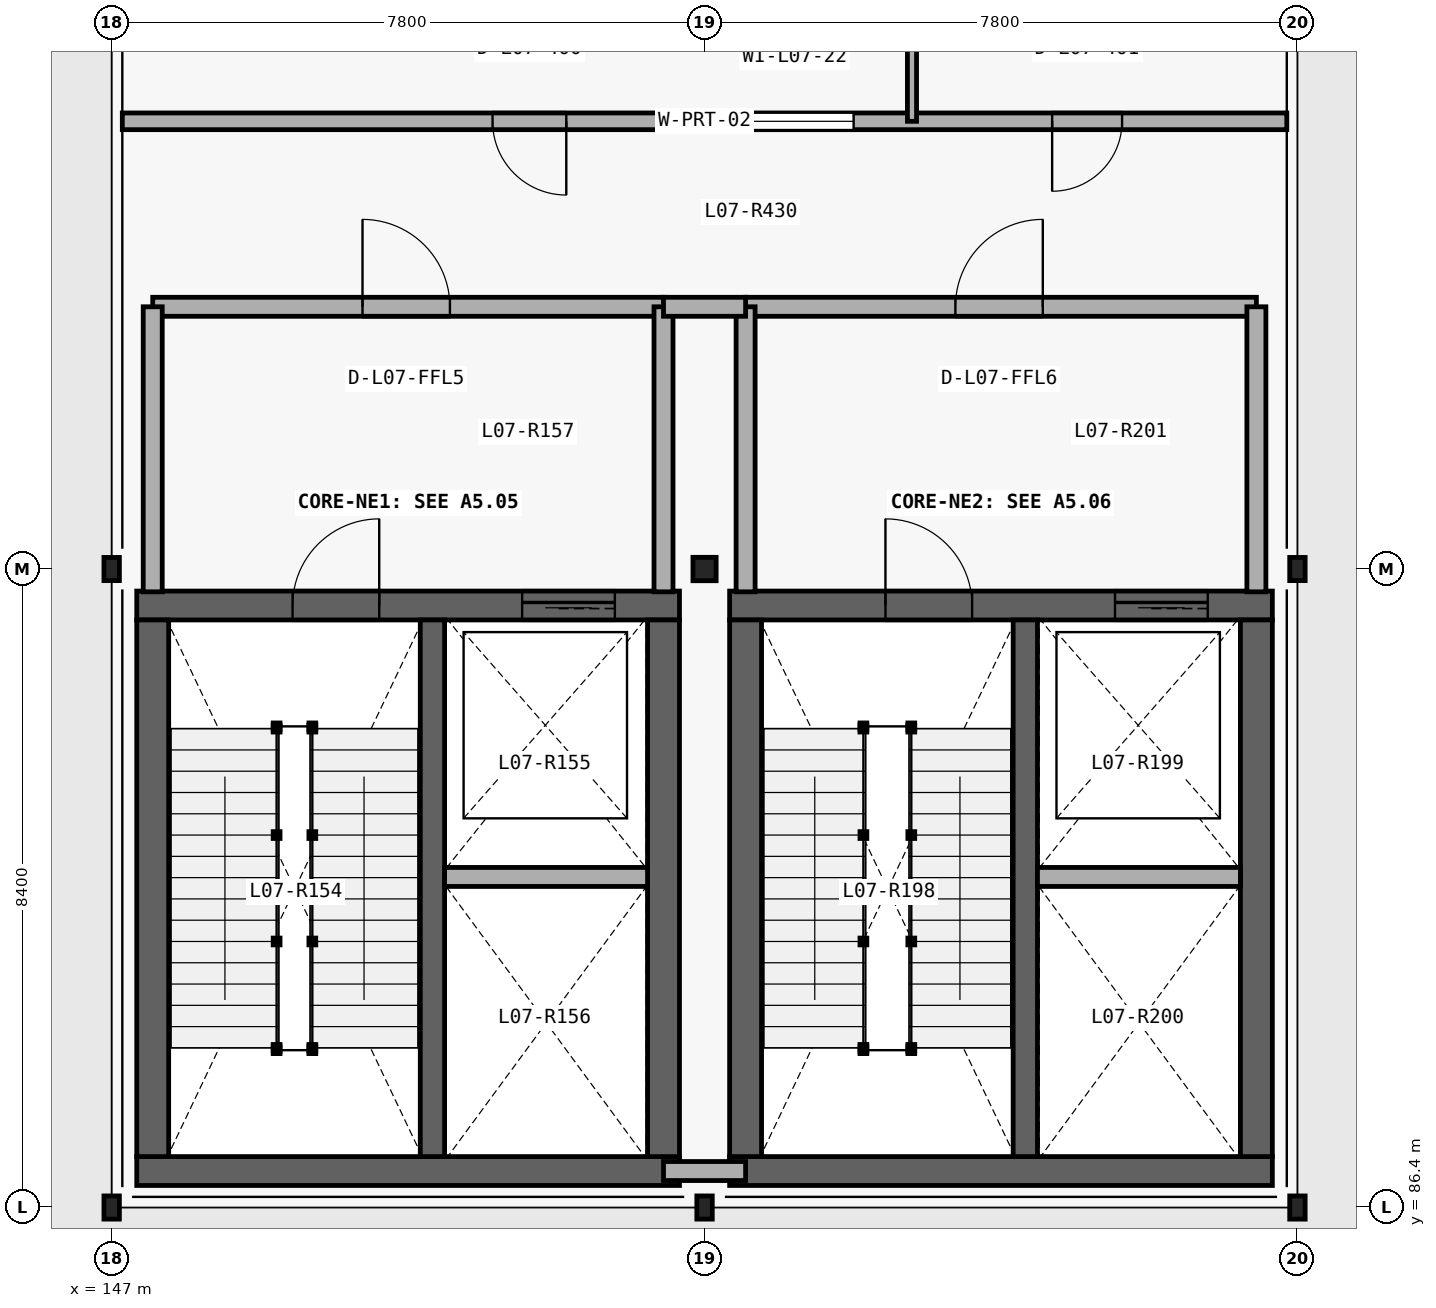
"""IFC4 building model, lengths in metres.
Left out: names, types, materials, properties, quantities, classifications, styles, units other than length and angle.
Written with IfcOpenShell. Run it as: python <this file> out.ifc"""

import sys

from ifc_helpers import new_model, si_unit, direction, frame, frame_2d, origin_with_axes, origin_2d_with_axis, place, context, subcontext, project, spatial, rectangle, hollow_rectangle, i_section, extrude, element, fill, save


model = new_model("IFC4")
c1 = context("Model", 3, precision=1e-05, world=origin_with_axes(), true_north=direction((0.0, 1.0)))
c2 = subcontext(c1, "Body", "Model", "MODEL_VIEW")
j1 = project(units=[si_unit("LENGTHUNIT", "METRE"), si_unit("PLANEANGLEUNIT", "RADIAN")], contexts=[c1])
p1 = place(None, origin_with_axes())
s1 = spatial("IfcSite", under=j1, at=p1, CompositionType="ELEMENT")
p2 = place(p1, origin_with_axes())
s2 = spatial("IfcBuilding", under=s1, at=p2, CompositionType="ELEMENT")
p3 = place(p2, frame((0.0, 0.0, 34.5), z_axis=(0.0, 0.0, 1.0), x_axis=(1.0, 0.0, 0.0)))
s3 = spatial("IfcBuildingStorey", under=s2, at=p3, CompositionType="ELEMENT", Elevation=34.5)
p4 = place(None, frame((147.33, 86.88, 34.5), z_axis=(0.0, 0.0, 1.0), x_axis=(1.0, 0.0, 0.0)))
e1 = element("IfcWall", 1, at=p4, inside=s3, PredefinedType="SHEAR", context=c2, shape_type="SweptSolid", body=[
    extrude(rectangle(XDim=7.14, YDim=0.38, at=frame_2d((3.57, 0.0), x_axis=(1.0, 0.0))), origin_with_axes(), (0.0, 0.0, 1.0), 4.5),
])
p5 = place(None, frame((154.47, 94.32, 34.5), z_axis=(0.0, 0.0, 1.0), x_axis=(-1.0, 0.0, 0.0)))
e2 = element("IfcWall", 2, at=p5, inside=s3, PredefinedType="SHEAR", context=c2, shape_type="SweptSolid", body=[
    extrude(rectangle(XDim=7.14, YDim=0.38, at=frame_2d((3.57, 0.0), x_axis=(1.0, 0.0))), origin_with_axes(), (0.0, 0.0, 1.0), 4.5),
])
p6 = place(None, frame((149.95, 94.32, 34.5), z_axis=(0.0, 0.0, 1.0), x_axis=(-1.0, 0.0, 0.0)))
e3 = element("IfcOpeningElement", 3, at=p6, cuts=e2, PredefinedType="OPENING", context=c2, shape_type="SweptSolid", body=[
    extrude(rectangle(XDim=1.14, YDim=2.18, at=frame_2d((0.0, 1.09), x_axis=(1.0, 0.0))), frame((0.0, 0.2, 0.0), z_axis=(0.0, -1.0, 0.0), x_axis=(1.0, 0.0, 0.0)), (0.0, 0.0, 1.0), 0.4),
])
p7 = place(None, frame((153.01, 94.32, 34.5), z_axis=(0.0, 0.0, 1.0), x_axis=(-1.0, 0.0, 0.0)))
e4 = element("IfcOpeningElement", 4, at=p7, cuts=e2, PredefinedType="OPENING", context=c2, shape_type="SweptSolid", body=[
    extrude(rectangle(XDim=1.22, YDim=2.28, at=frame_2d((0.0, 1.14), x_axis=(1.0, 0.0))), frame((0.0, 0.2, 0.0), z_axis=(0.0, -1.0, 0.0), x_axis=(1.0, 0.0, 0.0)), (0.0, 0.0, 1.0), 0.4),
])
for number, where, z_axis, x_axis in (
    (5, (154.26, 87.07, 34.5), (0.0, 0.0, 1.0), (0.0, 1.0, 0.0)),
    (6, (147.54, 94.13, 34.5), (0.0, 0.0, 1.0), (0.0, -1.0, 0.0)),
):
    element("IfcWall", number, at=place(None, frame(where, z_axis=z_axis, x_axis=x_axis)), inside=s3, PredefinedType="SHEAR", context=c2, shape_type="SweptSolid", body=[
        extrude(rectangle(XDim=7.06, YDim=0.42, at=frame_2d((3.53, 0.0), x_axis=(1.0, 0.0))), origin_with_axes(), (0.0, 0.0, 1.0), 4.5),
    ])
p8 = place(None, frame((151.22, 87.07, 34.5), z_axis=(0.0, 0.0, 1.0), x_axis=(0.0, 1.0, 0.0)))
e7 = element("IfcWall", 7, at=p8, inside=s3, PredefinedType="SHEAR", context=c2, shape_type="SweptSolid", body=[
    extrude(rectangle(XDim=7.06, YDim=0.32, at=frame_2d((3.53, 0.0), x_axis=(1.0, 0.0))), origin_with_axes(), (0.0, 0.0, 1.0), 4.5),
])
p9 = place(None, frame((151.38, 90.749, 34.5), z_axis=(0.0, 0.0, 1.0), x_axis=(1.0, 0.0, 0.0)))
e8 = element("IfcWall", 8, at=p9, inside=s3, PredefinedType="PARTITIONING", context=c2, shape_type="SweptSolid", body=[
    extrude(rectangle(XDim=2.67, YDim=0.25, at=frame_2d((1.335, 0.0), x_axis=(1.0, 0.0))), origin_with_axes(), (0.0, 0.0, 1.0), 4.14),
])
p10 = place(None, frame((154.26, 98.25, 34.5), z_axis=(0.0, 0.0, 1.0), x_axis=(-1.0, 0.0, 0.0)))
e9 = element("IfcWall", 9, at=p10, inside=s3, PredefinedType="PARTITIONING", context=c2, shape_type="SweptSolid", body=[
    extrude(rectangle(XDim=6.72, YDim=0.25, at=frame_2d((3.36, 0.0), x_axis=(1.0, 0.0))), origin_with_axes(), (0.0, 0.0, 1.0), 4.14),
])
p11 = place(None, frame((150.875, 98.25, 34.5), z_axis=(0.0, 0.0, 1.0), x_axis=(-1.0, 0.0, 0.0)))
e10 = element("IfcOpeningElement", 10, at=p11, cuts=e9, PredefinedType="OPENING", context=c2, shape_type="SweptSolid", body=[
    extrude(rectangle(XDim=1.15, YDim=2.25, at=frame_2d((0.0, 1.125), x_axis=(1.0, 0.0))), frame((0.0, 0.135, 0.0), z_axis=(0.0, -1.0, 0.0), x_axis=(1.0, 0.0, 0.0)), (0.0, 0.0, 1.0), 0.27),
])
for number, where, z_axis, x_axis in (
    (11, (147.54, 94.5, 34.5), (0.0, 0.0, 1.0), (0.0, 1.0, 0.0)),
    (12, (154.26, 94.5, 34.5), (0.0, 0.0, 1.0), (0.0, 1.0, 0.0)),
):
    element("IfcWall", number, at=place(None, frame(where, z_axis=z_axis, x_axis=x_axis)), inside=s3, PredefinedType="PARTITIONING", context=c2, shape_type="SweptSolid", body=[
        extrude(rectangle(XDim=3.75, YDim=0.25, at=frame_2d((1.875, 0.0), x_axis=(1.0, 0.0))), origin_with_axes(), (0.0, 0.0, 1.0), 4.14),
    ])
p12 = place(None, frame((155.13, 86.88, 34.5), z_axis=(0.0, 0.0, 1.0), x_axis=(1.0, 0.0, 0.0)))
e13 = element("IfcWall", 13, at=p12, inside=s3, PredefinedType="SHEAR", context=c2, shape_type="SweptSolid", body=[
    extrude(rectangle(XDim=7.14, YDim=0.38, at=frame_2d((3.57, 0.0), x_axis=(1.0, 0.0))), origin_with_axes(), (0.0, 0.0, 1.0), 4.5),
])
p13 = place(None, frame((162.27, 94.32, 34.5), z_axis=(0.0, 0.0, 1.0), x_axis=(-1.0, 0.0, 0.0)))
e14 = element("IfcWall", 14, at=p13, inside=s3, PredefinedType="SHEAR", context=c2, shape_type="SweptSolid", body=[
    extrude(rectangle(XDim=7.14, YDim=0.38, at=frame_2d((3.57, 0.0), x_axis=(1.0, 0.0))), origin_with_axes(), (0.0, 0.0, 1.0), 4.5),
])
p14 = place(None, frame((157.75, 94.32, 34.5), z_axis=(0.0, 0.0, 1.0), x_axis=(-1.0, 0.0, 0.0)))
e15 = element("IfcOpeningElement", 15, at=p14, cuts=e14, PredefinedType="OPENING", context=c2, shape_type="SweptSolid", body=[
    extrude(rectangle(XDim=1.14, YDim=2.18, at=frame_2d((0.0, 1.09), x_axis=(1.0, 0.0))), frame((0.0, 0.2, 0.0), z_axis=(0.0, -1.0, 0.0), x_axis=(1.0, 0.0, 0.0)), (0.0, 0.0, 1.0), 0.4),
])
p15 = place(None, frame((160.81, 94.32, 34.5), z_axis=(0.0, 0.0, 1.0), x_axis=(-1.0, 0.0, 0.0)))
e16 = element("IfcOpeningElement", 16, at=p15, cuts=e14, PredefinedType="OPENING", context=c2, shape_type="SweptSolid", body=[
    extrude(rectangle(XDim=1.22, YDim=2.28, at=frame_2d((0.0, 1.14), x_axis=(1.0, 0.0))), frame((0.0, 0.2, 0.0), z_axis=(0.0, -1.0, 0.0), x_axis=(1.0, 0.0, 0.0)), (0.0, 0.0, 1.0), 0.4),
])
for number, where, z_axis, x_axis in (
    (17, (162.06, 87.07, 34.5), (0.0, 0.0, 1.0), (0.0, 1.0, 0.0)),
    (18, (155.34, 94.13, 34.5), (0.0, 0.0, 1.0), (0.0, -1.0, 0.0)),
):
    element("IfcWall", number, at=place(None, frame(where, z_axis=z_axis, x_axis=x_axis)), inside=s3, PredefinedType="SHEAR", context=c2, shape_type="SweptSolid", body=[
        extrude(rectangle(XDim=7.06, YDim=0.42, at=frame_2d((3.53, 0.0), x_axis=(1.0, 0.0))), origin_with_axes(), (0.0, 0.0, 1.0), 4.5),
    ])
p16 = place(None, frame((159.02, 87.07, 34.5), z_axis=(0.0, 0.0, 1.0), x_axis=(0.0, 1.0, 0.0)))
e19 = element("IfcWall", 19, at=p16, inside=s3, PredefinedType="SHEAR", context=c2, shape_type="SweptSolid", body=[
    extrude(rectangle(XDim=7.06, YDim=0.32, at=frame_2d((3.53, 0.0), x_axis=(1.0, 0.0))), origin_with_axes(), (0.0, 0.0, 1.0), 4.5),
])
p17 = place(None, frame((159.18, 90.749, 34.5), z_axis=(0.0, 0.0, 1.0), x_axis=(1.0, 0.0, 0.0)))
e20 = element("IfcWall", 20, at=p17, inside=s3, PredefinedType="PARTITIONING", context=c2, shape_type="SweptSolid", body=[
    extrude(rectangle(XDim=2.67, YDim=0.25, at=frame_2d((1.335, 0.0), x_axis=(1.0, 0.0))), origin_with_axes(), (0.0, 0.0, 1.0), 4.14),
])
p18 = place(None, frame((162.06, 98.25, 34.5), z_axis=(0.0, 0.0, 1.0), x_axis=(-1.0, 0.0, 0.0)))
e21 = element("IfcWall", 21, at=p18, inside=s3, PredefinedType="PARTITIONING", context=c2, shape_type="SweptSolid", body=[
    extrude(rectangle(XDim=6.72, YDim=0.25, at=frame_2d((3.36, 0.0), x_axis=(1.0, 0.0))), origin_with_axes(), (0.0, 0.0, 1.0), 4.14),
])
p19 = place(None, frame((158.675, 98.25, 34.5), z_axis=(0.0, 0.0, 1.0), x_axis=(-1.0, 0.0, 0.0)))
e22 = element("IfcOpeningElement", 22, at=p19, cuts=e21, PredefinedType="OPENING", context=c2, shape_type="SweptSolid", body=[
    extrude(rectangle(XDim=1.15, YDim=2.25, at=frame_2d((0.0, 1.125), x_axis=(1.0, 0.0))), frame((0.0, 0.135, 0.0), z_axis=(0.0, -1.0, 0.0), x_axis=(1.0, 0.0, 0.0)), (0.0, 0.0, 1.0), 0.27),
])
for number, where, z_axis, x_axis in (
    (23, (155.34, 94.5, 34.5), (0.0, 0.0, 1.0), (0.0, 1.0, 0.0)),
    (24, (162.06, 94.5, 34.5), (0.0, 0.0, 1.0), (0.0, 1.0, 0.0)),
):
    element("IfcWall", number, at=place(None, frame(where, z_axis=z_axis, x_axis=x_axis)), inside=s3, PredefinedType="PARTITIONING", context=c2, shape_type="SweptSolid", body=[
        extrude(rectangle(XDim=3.75, YDim=0.25, at=frame_2d((1.875, 0.0), x_axis=(1.0, 0.0))), origin_with_axes(), (0.0, 0.0, 1.0), 4.14),
    ])
for number, where, z_axis, x_axis in (
    (25, (154.26, 98.25, 34.5), (0.0, 0.0, 1.0), (1.0, 0.0, 0.0)),
    (26, (154.26, 86.88, 34.5), (0.0, 0.0, 1.0), (1.0, 0.0, 0.0)),
):
    element("IfcWall", number, at=place(None, frame(where, z_axis=z_axis, x_axis=x_axis)), inside=s3, PredefinedType="PARTITIONING", context=c2, shape_type="SweptSolid", body=[
        extrude(rectangle(XDim=1.08, YDim=0.25, at=frame_2d((0.54, 0.0), x_axis=(1.0, 0.0))), origin_with_axes(), (0.0, 0.0, 1.0), 4.14),
    ])
p20 = place(None, frame((147.14, 100.69, 34.5), z_axis=(0.0, 0.0, 1.0), x_axis=(1.0, 0.0, 0.0)))
e27 = element("IfcWall", 27, at=p20, inside=s3, PredefinedType="PARTITIONING", context=c2, shape_type="SweptSolid", body=[
    extrude(rectangle(XDim=15.32, YDim=0.22, at=frame_2d((7.66, 0.0), x_axis=(1.0, 0.0))), origin_with_axes(), (0.0, 0.0, 1.0), 4.14),
])
p21 = place(None, frame((152.496, 100.69, 34.5), z_axis=(0.0, 0.0, 1.0), x_axis=(1.0, 0.0, 0.0)))
e28 = element("IfcOpeningElement", 28, at=p21, cuts=e27, PredefinedType="OPENING", context=c2, shape_type="SweptSolid", body=[
    extrude(rectangle(XDim=0.97, YDim=2.26, at=frame_2d((0.0, 1.13), x_axis=(1.0, 0.0))), frame((0.0, 0.12, 0.0), z_axis=(0.0, -1.0, 0.0), x_axis=(1.0, 0.0, 0.0)), (0.0, 0.0, 1.0), 0.24),
])
p22 = place(None, frame((159.833, 100.69, 34.5), z_axis=(0.0, 0.0, 1.0), x_axis=(1.0, 0.0, 0.0)))
e29 = element("IfcOpeningElement", 29, at=p22, cuts=e27, PredefinedType="OPENING", context=c2, shape_type="SweptSolid", body=[
    extrude(rectangle(XDim=0.92, YDim=2.14, at=frame_2d((0.0, 1.07), x_axis=(1.0, 0.0))), frame((0.0, 0.12, 0.0), z_axis=(0.0, -1.0, 0.0), x_axis=(1.0, 0.0, 0.0)), (0.0, 0.0, 1.0), 0.24),
])
p23 = place(None, frame((155.986, 100.69, 35.55), z_axis=(0.0, 0.0, 1.0), x_axis=(1.0, 0.0, 0.0)))
e30 = element("IfcOpeningElement", 30, at=p23, cuts=e27, PredefinedType="OPENING", context=c2, shape_type="SweptSolid", body=[
    extrude(rectangle(XDim=1.55, YDim=1.35, at=frame_2d((0.0, 0.675), x_axis=(1.0, 0.0))), frame((0.0, 0.12, 0.0), z_axis=(0.0, -1.0, 0.0), x_axis=(1.0, 0.0, 0.0)), (0.0, 0.0, 1.0), 0.24),
])
p24 = place(None, frame((157.529, 100.69, 34.5), z_axis=(0.0, 0.0, 1.0), x_axis=(0.0, 1.0, 0.0)))
e31 = element("IfcWall", 31, at=p24, inside=s3, PredefinedType="PARTITIONING", context=c2, shape_type="SweptSolid", body=[
    extrude(rectangle(XDim=2.37, YDim=0.12, at=frame_2d((1.185, 0.0), x_axis=(1.0, 0.0))), origin_with_axes(), (0.0, 0.0, 1.0), 4.14),
])
for number, where, z_axis, x_axis in (
    (32, (147.0, 86.4, 34.5), (0.0, 0.0, 1.0), (1.0, 0.0, 0.0)),
    (33, (147.0, 94.8, 34.5), (0.0, 0.0, 1.0), (1.0, 0.0, 0.0)),
    (34, (154.8, 86.4, 34.5), (0.0, 0.0, 1.0), (1.0, 0.0, 0.0)),
):
    element("IfcColumn", number, at=place(None, frame(where, z_axis=z_axis, x_axis=x_axis)), inside=s3, PredefinedType="COLUMN", context=c2, shape_type="SweptSolid", body=[
        extrude(hollow_rectangle(XDim=0.203, YDim=0.305, WallThickness=0.013, InnerFilletRadius=0.025, OuterFilletRadius=0.013, at=origin_2d_with_axis()), origin_with_axes(), (0.0, 0.0, 1.0), 4.5),
    ])
p25 = place(None, frame((154.8, 94.8, 34.5), z_axis=(0.0, 0.0, 1.0), x_axis=(1.0, 0.0, 0.0)))
e35 = element("IfcColumn", 35, at=p25, inside=s3, PredefinedType="COLUMN", context=c2, shape_type="SweptSolid", body=[
    extrude(i_section(OverallWidth=0.305, OverallDepth=0.308, WebThickness=0.01, FlangeThickness=0.015, at=origin_2d_with_axis()), origin_with_axes(), (0.0, 0.0, 1.0), 4.5),
])
for number, where, z_axis, x_axis in (
    (36, (162.6, 86.4, 34.5), (0.0, 0.0, 1.0), (1.0, 0.0, 0.0)),
    (37, (162.6, 94.8, 34.5), (0.0, 0.0, 1.0), (1.0, 0.0, 0.0)),
):
    element("IfcColumn", number, at=place(None, frame(where, z_axis=z_axis, x_axis=x_axis)), inside=s3, PredefinedType="COLUMN", context=c2, shape_type="SweptSolid", body=[
        extrude(hollow_rectangle(XDim=0.203, YDim=0.305, WallThickness=0.013, InnerFilletRadius=0.025, OuterFilletRadius=0.013, at=origin_2d_with_axis()), origin_with_axes(), (0.0, 0.0, 1.0), 4.5),
    ])
p26 = place(None, frame((149.95, 94.32, 34.5), z_axis=(0.0, 0.0, 1.0), x_axis=(1.0, 0.0, 0.0)))
e38 = element("IfcDoor", 38, at=p26, inside=s3, OperationType="SINGLE_SWING_LEFT", PredefinedType="DOOR", context=c2, shape_type="SweptSolid", body=[
    extrude(rectangle(XDim=1.14, YDim=2.18, at=frame_2d((0.0, 1.09), x_axis=(1.0, 0.0))), frame((0.0, 0.04, 0.0), z_axis=(0.0, -1.0, 0.0), x_axis=(1.0, 0.0, 0.0)), (0.0, 0.0, 1.0), 0.08),
])
fill(e3, e38)
p27 = place(None, frame((153.01, 94.32, 34.5), z_axis=(0.0, 0.0, 1.0), x_axis=(1.0, 0.0, 0.0)))
e39 = element("IfcDoor", 39, at=p27, inside=s3, OperationType="SLIDING_TO_LEFT", PredefinedType="DOOR", context=c2, shape_type="SweptSolid", body=[
    extrude(rectangle(XDim=1.22, YDim=2.28, at=frame_2d((0.0, 1.14), x_axis=(1.0, 0.0))), frame((0.0, 0.04, 0.0), z_axis=(0.0, -1.0, 0.0), x_axis=(1.0, 0.0, 0.0)), (0.0, 0.0, 1.0), 0.08),
])
fill(e4, e39)
p28 = place(None, frame((150.875, 98.25, 34.5), z_axis=(0.0, 0.0, 1.0), x_axis=(1.0, 0.0, 0.0)))
e40 = element("IfcDoor", 40, at=p28, inside=s3, OperationType="SINGLE_SWING_RIGHT", PredefinedType="DOOR", context=c2, shape_type="SweptSolid", body=[
    extrude(rectangle(XDim=1.15, YDim=2.25, at=frame_2d((0.0, 1.125), x_axis=(1.0, 0.0))), frame((0.0, 0.04, 0.0), z_axis=(0.0, -1.0, 0.0), x_axis=(1.0, 0.0, 0.0)), (0.0, 0.0, 1.0), 0.08),
])
fill(e10, e40)
p29 = place(None, frame((157.75, 94.32, 34.5), z_axis=(0.0, 0.0, 1.0), x_axis=(1.0, 0.0, 0.0)))
e41 = element("IfcDoor", 41, at=p29, inside=s3, OperationType="SINGLE_SWING_RIGHT", PredefinedType="DOOR", context=c2, shape_type="SweptSolid", body=[
    extrude(rectangle(XDim=1.14, YDim=2.18, at=frame_2d((0.0, 1.09), x_axis=(1.0, 0.0))), frame((0.0, 0.04, 0.0), z_axis=(0.0, -1.0, 0.0), x_axis=(1.0, 0.0, 0.0)), (0.0, 0.0, 1.0), 0.08),
])
fill(e15, e41)
p30 = place(None, frame((160.81, 94.32, 34.5), z_axis=(0.0, 0.0, 1.0), x_axis=(1.0, 0.0, 0.0)))
e42 = element("IfcDoor", 42, at=p30, inside=s3, OperationType="SLIDING_TO_LEFT", PredefinedType="DOOR", context=c2, shape_type="SweptSolid", body=[
    extrude(rectangle(XDim=1.22, YDim=2.28, at=frame_2d((0.0, 1.14), x_axis=(1.0, 0.0))), frame((0.0, 0.04, 0.0), z_axis=(0.0, -1.0, 0.0), x_axis=(1.0, 0.0, 0.0)), (0.0, 0.0, 1.0), 0.08),
])
fill(e16, e42)
p31 = place(None, frame((158.675, 98.25, 34.5), z_axis=(0.0, 0.0, 1.0), x_axis=(1.0, 0.0, 0.0)))
e43 = element("IfcDoor", 43, at=p31, inside=s3, OperationType="SINGLE_SWING_LEFT", PredefinedType="DOOR", context=c2, shape_type="SweptSolid", body=[
    extrude(rectangle(XDim=1.15, YDim=2.25, at=frame_2d((0.0, 1.125), x_axis=(1.0, 0.0))), frame((0.0, 0.04, 0.0), z_axis=(0.0, -1.0, 0.0), x_axis=(1.0, 0.0, 0.0)), (0.0, 0.0, 1.0), 0.08),
])
fill(e22, e43)
p32 = place(None, frame((152.496, 100.69, 34.5), z_axis=(0.0, 0.0, 1.0), x_axis=(-1.0, 0.0, 0.0)))
e44 = element("IfcDoor", 44, at=p32, inside=s3, OperationType="SINGLE_SWING_RIGHT", PredefinedType="DOOR", context=c2, shape_type="SweptSolid", body=[
    extrude(rectangle(XDim=0.97, YDim=2.26, at=frame_2d((0.0, 1.13), x_axis=(1.0, 0.0))), frame((0.0, 0.04, 0.0), z_axis=(0.0, -1.0, 0.0), x_axis=(1.0, 0.0, 0.0)), (0.0, 0.0, 1.0), 0.08),
])
fill(e28, e44)
p33 = place(None, frame((159.833, 100.69, 34.5), z_axis=(0.0, 0.0, 1.0), x_axis=(-1.0, 0.0, 0.0)))
e45 = element("IfcDoor", 45, at=p33, inside=s3, OperationType="SINGLE_SWING_LEFT", PredefinedType="DOOR", context=c2, shape_type="SweptSolid", body=[
    extrude(rectangle(XDim=0.92, YDim=2.14, at=frame_2d((0.0, 1.07), x_axis=(1.0, 0.0))), frame((0.0, 0.04, 0.0), z_axis=(0.0, -1.0, 0.0), x_axis=(1.0, 0.0, 0.0)), (0.0, 0.0, 1.0), 0.08),
])
fill(e29, e45)
p34 = place(None, frame((155.986, 100.69, 35.55), z_axis=(0.0, 0.0, 1.0), x_axis=(1.0, 0.0, 0.0)))
e46 = element("IfcWindow", 46, at=p34, inside=s3, PartitioningType="SINGLE_PANEL", PredefinedType="WINDOW", context=c2, shape_type="SweptSolid", body=[
    extrude(rectangle(XDim=1.55, YDim=1.35, at=frame_2d((0.0, 0.675), x_axis=(1.0, 0.0))), frame((0.0, 0.03, 0.0), z_axis=(0.0, -1.0, 0.0), x_axis=(1.0, 0.0, 0.0)), (0.0, 0.0, 1.0), 0.06),
])
fill(e30, e46)
save(model, sys.argv[1])
